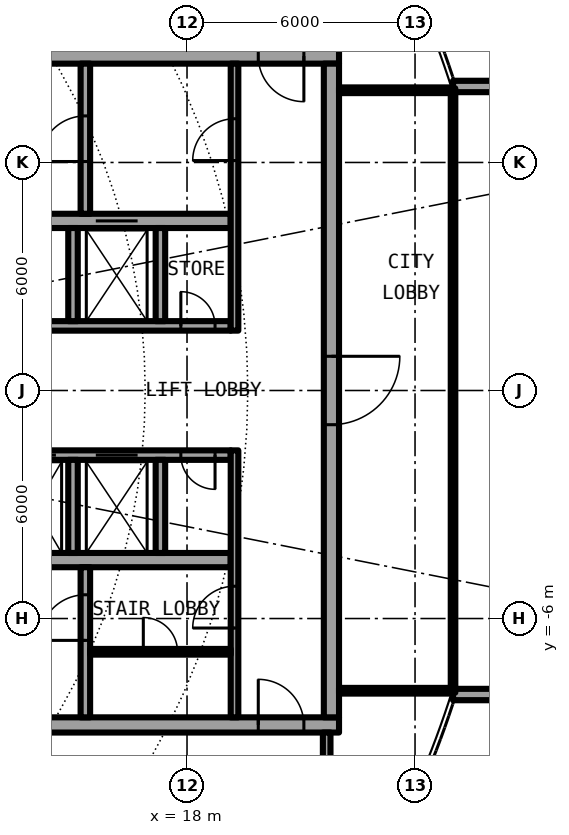
"""IFC4 building model, lengths in metres.
Left out: names, types, materials, properties, quantities, classifications, styles, units other than length and angle.
Written with IfcOpenShell. Run it as: python <this file> out.ifc"""

import sys

from ifc_helpers import new_model, si_unit, direction, frame, frame_2d, origin, place, context, subcontext, project, spatial, rectangle, extrude, element, fill, save


model = new_model("IFC4")
c1 = context("Model", 3, precision=1e-05, world=origin(), true_north=direction((0.0, 1.0)))
c2 = subcontext(c1, "Body", "Model", "MODEL_VIEW")
j1 = project(units=[si_unit("LENGTHUNIT", "METRE"), si_unit("PLANEANGLEUNIT", "RADIAN")], contexts=[c1])
p1 = place(None, origin())
s1 = spatial("IfcSite", under=j1, at=p1, CompositionType="ELEMENT")
p2 = place(p1, origin())
s2 = spatial("IfcBuilding", under=s1, at=p2, CompositionType="ELEMENT")
p3 = place(p2, frame((0.0, 0.0, 234.05)))
s3 = spatial("IfcBuildingStorey", under=s2, at=p3, CompositionType="ELEMENT", Elevation=234.05)
for number, where, z_axis, x_axis in (
    (1, (25.0, 8.0, 0.0), (0.0, 0.0, 1.0), (1.0, 0.0, 0.0)),
    (2, (25.0, -8.0, 0.0), (0.0, 0.0, 1.0), (1.0, 0.0, 0.0)),
):
    element("IfcWall", number, at=place(p3, frame(where, z_axis=z_axis, x_axis=x_axis)), inside=s3, PredefinedType="SOLIDWALL", context=c2, shape_type="SweptSolid", body=[
        extrude(rectangle(XDim=2.667, YDim=0.3, at=frame_2d((1.333, 0.0))), origin(), (0.0, 0.0, 1.0), 2.7),
    ])
p4 = place(p3, frame((22.0, 8.8, 0.0), z_axis=(0.0, 0.0, 1.0), x_axis=(-1.0, 0.0, 0.0)))
e3 = element("IfcWall", 3, at=p4, inside=s3, PredefinedType="SHEAR", context=c2, shape_type="SweptSolid", body=[
    extrude(rectangle(XDim=13.4, YDim=0.4, at=frame_2d((6.7, 0.0))), origin(), (0.0, 0.0, 1.0), 3.05),
])
p5 = place(p4, frame((0.925, 0.0, 0.0)))
e4 = element("IfcOpeningElement", 4, at=p5, cuts=e3, PredefinedType="OPENING", context=c2, shape_type="SweptSolid", body=[
    extrude(rectangle(XDim=1.2, YDim=2.3, at=frame_2d((0.6, 1.15))), frame((0.0, 0.21, 0.0), z_axis=(0.0, -1.0, 0.0), x_axis=(1.0, 0.0, 0.0)), (0.0, 0.0, 1.0), 0.42),
])
p6 = place(p3, frame((8.6, -8.8, 0.0), z_axis=(0.0, 0.0, 1.0), x_axis=(1.0, 0.0, 0.0)))
e5 = element("IfcWall", 5, at=p6, inside=s3, PredefinedType="SHEAR", context=c2, shape_type="SweptSolid", body=[
    extrude(rectangle(XDim=13.4, YDim=0.4, at=frame_2d((6.7, 0.0))), origin(), (0.0, 0.0, 1.0), 3.05),
])
p7 = place(p6, frame((11.275, 0.0, 0.0)))
e6 = element("IfcOpeningElement", 6, at=p7, cuts=e5, PredefinedType="OPENING", context=c2, shape_type="SweptSolid", body=[
    extrude(rectangle(XDim=1.2, YDim=2.3, at=frame_2d((0.6, 1.15))), frame((0.0, 0.21, 0.0), z_axis=(0.0, -1.0, 0.0), x_axis=(1.0, 0.0, 0.0)), (0.0, 0.0, 1.0), 0.42),
])
p8 = place(p3, frame((21.8, 8.6, 0.0), z_axis=(0.0, 0.0, 1.0), x_axis=(0.0, -1.0, 0.0)))
e7 = element("IfcWall", 7, at=p8, inside=s3, PredefinedType="SHEAR", context=c2, shape_type="SweptSolid", body=[
    extrude(rectangle(XDim=17.2, YDim=0.4, at=frame_2d((8.6, 0.0))), origin(), (0.0, 0.0, 1.0), 3.05),
])
p9 = place(p8, frame((7.7, 0.0, 0.0)))
e8 = element("IfcOpeningElement", 8, at=p9, cuts=e7, PredefinedType="OPENING", context=c2, shape_type="SweptSolid", body=[
    extrude(rectangle(XDim=1.8, YDim=2.3, at=frame_2d((0.9, 1.15))), frame((0.0, 0.21, 0.0), z_axis=(0.0, -1.0, 0.0), x_axis=(1.0, 0.0, 0.0)), (0.0, 0.0, 1.0), 0.42),
])
p10 = place(p3, frame((9.0, 1.7, 0.0), z_axis=(0.0, 0.0, 1.0), x_axis=(1.0, 0.0, 0.0)))
e9 = element("IfcWall", 9, at=p10, inside=s3, PredefinedType="SHEAR", context=c2, shape_type="SweptSolid", body=[
    extrude(rectangle(XDim=10.15, YDim=0.25, at=frame_2d((5.075, 0.0))), origin(), (0.0, 0.0, 1.0), 3.05),
])
p11 = place(p10, frame((2.488, 0.0, 0.0)))
e10 = element("IfcOpeningElement", 10, at=p11, cuts=e9, PredefinedType="OPENING", context=c2, shape_type="SweptSolid", body=[
    extrude(rectangle(XDim=0.9, YDim=2.3, at=frame_2d((0.45, 1.15))), frame((0.0, 0.135, 0.0), z_axis=(0.0, -1.0, 0.0), x_axis=(1.0, 0.0, 0.0)), (0.0, 0.0, 1.0), 0.27),
])
p12 = place(p10, frame((8.837, 0.0, 0.0)))
e11 = element("IfcOpeningElement", 11, at=p12, cuts=e9, PredefinedType="OPENING", context=c2, shape_type="SweptSolid", body=[
    extrude(rectangle(XDim=0.9, YDim=2.3, at=frame_2d((0.45, 1.15))), frame((0.0, 0.135, 0.0), z_axis=(0.0, -1.0, 0.0), x_axis=(1.0, 0.0, 0.0)), (0.0, 0.0, 1.0), 0.27),
])
p13 = place(p3, frame((9.0, 4.462, 0.0), z_axis=(0.0, 0.0, 1.0), x_axis=(1.0, 0.0, 0.0)))
e12 = element("IfcWall", 12, at=p13, inside=s3, PredefinedType="SHEAR", context=c2, shape_type="SweptSolid", body=[
    extrude(rectangle(XDim=10.15, YDim=0.375, at=frame_2d((5.075, 0.0))), origin(), (0.0, 0.0, 1.0), 3.05),
])
p14 = place(p13, frame((6.6, 0.0, 0.0)))
e13 = element("IfcOpeningElement", 13, at=p14, cuts=e12, PredefinedType="OPENING", context=c2, shape_type="SweptSolid", body=[
    extrude(rectangle(XDim=1.1, YDim=2.3, at=frame_2d((0.55, 1.15))), frame((0.0, 0.198, 0.0), z_axis=(0.0, -1.0, 0.0), x_axis=(1.0, 0.0, 0.0)), (0.0, 0.0, 1.0), 0.395),
])
p15 = place(p3, frame((15.325, 4.65, 0.0), z_axis=(0.0, 0.0, 1.0), x_axis=(0.0, 1.0, 0.0)))
e14 = element("IfcWall", 14, at=p15, inside=s3, PredefinedType="SHEAR", context=c2, shape_type="SweptSolid", body=[
    extrude(rectangle(XDim=3.95, YDim=0.25, at=frame_2d((1.975, 0.0))), origin(), (0.0, 0.0, 1.0), 3.05),
])
p16 = place(p15, frame((1.375, 0.0, 0.0)))
e15 = element("IfcOpeningElement", 15, at=p16, cuts=e14, PredefinedType="OPENING", context=c2, shape_type="SweptSolid", body=[
    extrude(rectangle(XDim=1.2, YDim=2.3, at=frame_2d((0.6, 1.15))), frame((0.0, 0.135, 0.0), z_axis=(0.0, -1.0, 0.0), x_axis=(1.0, 0.0, 0.0)), (0.0, 0.0, 1.0), 0.27),
])
for number, where, z_axis, x_axis in (
    (16, (15.0, 1.825, 0.0), (0.0, 0.0, 1.0), (0.0, 1.0, 0.0)),
    (17, (17.3, 1.825, 0.0), (0.0, 0.0, 1.0), (0.0, 1.0, 0.0)),
):
    element("IfcWall", number, at=place(p3, frame(where, z_axis=z_axis, x_axis=x_axis)), inside=s3, PredefinedType="SOLIDWALL", context=c2, shape_type="SweptSolid", body=[
        extrude(rectangle(XDim=2.45, YDim=0.25, at=frame_2d((1.225, 0.0))), origin(), (0.0, 0.0, 1.0), 2.7),
    ])
p17 = place(p3, frame((19.25, 1.575, 0.0), z_axis=(0.0, 0.0, 1.0), x_axis=(0.0, 1.0, 0.0)))
e18 = element("IfcWall", 18, at=p17, inside=s3, PredefinedType="SOLIDWALL", context=c2, shape_type="SweptSolid", body=[
    extrude(rectangle(XDim=7.025, YDim=0.2, at=frame_2d((3.513, 0.0))), origin(), (0.0, 0.0, 1.0), 2.7),
])
p18 = place(p17, frame((4.475, 0.0, 0.0)))
e19 = element("IfcOpeningElement", 19, at=p18, cuts=e18, PredefinedType="OPENING", context=c2, shape_type="SweptSolid", body=[
    extrude(rectangle(XDim=1.1, YDim=2.3, at=frame_2d((0.55, 1.15))), frame((0.0, 0.11, 0.0), z_axis=(0.0, -1.0, 0.0), x_axis=(1.0, 0.0, 0.0)), (0.0, 0.0, 1.0), 0.22),
])
p19 = place(p3, frame((19.15, -1.7, 0.0), z_axis=(0.0, 0.0, 1.0), x_axis=(-1.0, 0.0, 0.0)))
e20 = element("IfcWall", 20, at=p19, inside=s3, PredefinedType="SHEAR", context=c2, shape_type="SweptSolid", body=[
    extrude(rectangle(XDim=10.15, YDim=0.25, at=frame_2d((5.075, 0.0))), origin(), (0.0, 0.0, 1.0), 3.05),
])
p20 = place(p19, frame((8.663, 0.0, 0.0)))
e21 = element("IfcOpeningElement", 21, at=p20, cuts=e20, PredefinedType="OPENING", context=c2, shape_type="SweptSolid", body=[
    extrude(rectangle(XDim=1.1, YDim=2.3, at=frame_2d((0.55, 1.15))), frame((0.0, 0.135, 0.0), z_axis=(0.0, -1.0, 0.0), x_axis=(1.0, 0.0, 0.0)), (0.0, 0.0, 1.0), 0.27),
])
p21 = place(p19, frame((6.6, 0.0, 0.0)))
e22 = element("IfcOpeningElement", 22, at=p21, cuts=e20, PredefinedType="OPENING", context=c2, shape_type="SweptSolid", body=[
    extrude(rectangle(XDim=1.1, YDim=2.3, at=frame_2d((0.55, 1.15))), frame((0.0, 0.135, 0.0), z_axis=(0.0, -1.0, 0.0), x_axis=(1.0, 0.0, 0.0)), (0.0, 0.0, 1.0), 0.27),
])
p22 = place(p19, frame((4.6, 0.0, 0.0)))
e23 = element("IfcOpeningElement", 23, at=p22, cuts=e20, PredefinedType="OPENING", context=c2, shape_type="SweptSolid", body=[
    extrude(rectangle(XDim=1.1, YDim=2.3, at=frame_2d((0.55, 1.15))), frame((0.0, 0.135, 0.0), z_axis=(0.0, -1.0, 0.0), x_axis=(1.0, 0.0, 0.0)), (0.0, 0.0, 1.0), 0.27),
])
p23 = place(p19, frame((2.45, 0.0, 0.0)))
e24 = element("IfcOpeningElement", 24, at=p23, cuts=e20, PredefinedType="OPENING", context=c2, shape_type="SweptSolid", body=[
    extrude(rectangle(XDim=1.1, YDim=2.3, at=frame_2d((0.55, 1.15))), frame((0.0, 0.135, 0.0), z_axis=(0.0, -1.0, 0.0), x_axis=(1.0, 0.0, 0.0)), (0.0, 0.0, 1.0), 0.27),
])
p24 = place(p19, frame((0.413, 0.0, 0.0)))
e25 = element("IfcOpeningElement", 25, at=p24, cuts=e20, PredefinedType="OPENING", context=c2, shape_type="SweptSolid", body=[
    extrude(rectangle(XDim=0.9, YDim=2.3, at=frame_2d((0.45, 1.15))), frame((0.0, 0.135, 0.0), z_axis=(0.0, -1.0, 0.0), x_axis=(1.0, 0.0, 0.0)), (0.0, 0.0, 1.0), 0.27),
])
p25 = place(p3, frame((9.0, -4.462, 0.0), z_axis=(0.0, 0.0, 1.0), x_axis=(1.0, 0.0, 0.0)))
e26 = element("IfcWall", 26, at=p25, inside=s3, PredefinedType="SHEAR", context=c2, shape_type="SweptSolid", body=[
    extrude(rectangle(XDim=10.15, YDim=0.375, at=frame_2d((5.075, 0.0))), origin(), (0.0, 0.0, 1.0), 3.05),
])
p26 = place(p3, frame((15.325, -8.6, 0.0), z_axis=(0.0, 0.0, 1.0), x_axis=(0.0, 1.0, 0.0)))
e27 = element("IfcWall", 27, at=p26, inside=s3, PredefinedType="SHEAR", context=c2, shape_type="SweptSolid", body=[
    extrude(rectangle(XDim=3.95, YDim=0.25, at=frame_2d((1.975, 0.0))), origin(), (0.0, 0.0, 1.0), 3.05),
])
p27 = place(p26, frame((2.025, 0.0, 0.0)))
e28 = element("IfcOpeningElement", 28, at=p27, cuts=e27, PredefinedType="OPENING", context=c2, shape_type="SweptSolid", body=[
    extrude(rectangle(XDim=1.2, YDim=2.3, at=frame_2d((0.6, 1.15))), frame((0.0, 0.135, 0.0), z_axis=(0.0, -1.0, 0.0), x_axis=(1.0, 0.0, 0.0)), (0.0, 0.0, 1.0), 0.27),
])
for number, where, z_axis, x_axis in (
    (29, (15.0, -1.825, 0.0), (0.0, 0.0, 1.0), (0.0, -1.0, 0.0)),
    (30, (17.3, -1.825, 0.0), (0.0, 0.0, 1.0), (0.0, -1.0, 0.0)),
):
    element("IfcWall", number, at=place(p3, frame(where, z_axis=z_axis, x_axis=x_axis)), inside=s3, PredefinedType="SOLIDWALL", context=c2, shape_type="SweptSolid", body=[
        extrude(rectangle(XDim=2.45, YDim=0.25, at=frame_2d((1.225, 0.0))), origin(), (0.0, 0.0, 1.0), 2.7),
    ])
p28 = place(p3, frame((19.25, -8.6, 0.0), z_axis=(0.0, 0.0, 1.0), x_axis=(0.0, 1.0, 0.0)))
e31 = element("IfcWall", 31, at=p28, inside=s3, PredefinedType="SOLIDWALL", context=c2, shape_type="SweptSolid", body=[
    extrude(rectangle(XDim=7.025, YDim=0.2, at=frame_2d((3.513, 0.0))), origin(), (0.0, 0.0, 1.0), 2.7),
])
p29 = place(p28, frame((2.35, 0.0, 0.0)))
e32 = element("IfcOpeningElement", 32, at=p29, cuts=e31, PredefinedType="OPENING", context=c2, shape_type="SweptSolid", body=[
    extrude(rectangle(XDim=1.1, YDim=2.3, at=frame_2d((0.55, 1.15))), frame((0.0, 0.11, 0.0), z_axis=(0.0, -1.0, 0.0), x_axis=(1.0, 0.0, 0.0)), (0.0, 0.0, 1.0), 0.22),
])
p30 = place(p3, frame((15.45, -6.875, 0.0), z_axis=(0.0, 0.0, 1.0), x_axis=(1.0, 0.0, 0.0)))
e33 = element("IfcWall", 33, at=p30, inside=s3, PredefinedType="PARTITIONING", context=c2, shape_type="SweptSolid", body=[
    extrude(rectangle(XDim=3.7, YDim=0.15, at=frame_2d((1.85, 0.0))), origin(), (0.0, 0.0, 1.0), 2.7),
])
p31 = place(p30, frame((1.4, 0.0, 0.0)))
e34 = element("IfcOpeningElement", 34, at=p31, cuts=e33, PredefinedType="OPENING", context=c2, shape_type="SweptSolid", body=[
    extrude(rectangle(XDim=0.9, YDim=2.3, at=frame_2d((0.45, 1.15))), frame((0.0, 0.085, 0.0), z_axis=(0.0, -1.0, 0.0), x_axis=(1.0, 0.0, 0.0)), (0.0, 0.0, 1.0), 0.17),
])
for number, where, z_axis, x_axis in (
    (35, (22.0, -7.9, 0.0), (0.0, 0.0, 1.0), (1.0, 0.0, 0.0)),
    (36, (22.0, 7.9, 0.0), (0.0, 0.0, 1.0), (1.0, 0.0, 0.0)),
):
    element("IfcWall", number, at=place(p3, frame(where, z_axis=z_axis, x_axis=x_axis)), inside=s3, PredefinedType="PARTITIONING", context=c2, shape_type="SweptSolid", body=[
        extrude(rectangle(XDim=2.94, YDim=0.15, at=frame_2d((1.47, 0.0))), origin(), (0.0, 0.0, 1.0), 2.7),
    ])
p32 = place(p3, frame((25.0, -7.95, 0.0), z_axis=(0.0, 0.0, 1.0), x_axis=(0.0, 1.0, 0.0)))
e37 = element("IfcWall", 37, at=p32, inside=s3, PredefinedType="PARTITIONING", context=c2, shape_type="SweptSolid", body=[
    extrude(rectangle(XDim=15.9, YDim=0.12, at=frame_2d((7.95, 0.0))), origin(), (0.0, 0.0, 1.0), 2.7),
])
p33 = place(p32, frame((0.95, 0.0, 0.1)))
e38 = element("IfcOpeningElement", 38, at=p33, cuts=e37, PredefinedType="OPENING", context=c2, shape_type="SweptSolid", body=[
    extrude(rectangle(XDim=14.0, YDim=2.35, at=frame_2d((7.0, 1.175))), frame((0.0, 0.07, 0.0), z_axis=(0.0, -1.0, 0.0), x_axis=(1.0, 0.0, 0.0)), (0.0, 0.0, 1.0), 0.14),
])
p34 = place(p3, frame((21.675, -10.8, 0.0), z_axis=(0.0, 0.0, 1.0), x_axis=(0.0, 1.0, 0.0)))
e39 = element("IfcWall", 39, at=p34, inside=s3, PredefinedType="PARTITIONING", context=c2, shape_type="SweptSolid", body=[
    extrude(rectangle(XDim=1.8, YDim=0.2, at=frame_2d((0.9, 0.0))), origin(), (0.0, 0.0, 1.0), 2.7),
])
p35 = place(p14, origin())
e40 = element("IfcDoor", 40, at=p35, inside=s3, OperationType="DOUBLE_DOOR_SLIDING", PredefinedType="DOOR", context=c2, shape_type="SweptSolid", body=[
    extrude(rectangle(XDim=1.1, YDim=2.3, at=frame_2d((0.55, 1.15))), frame((0.0, 0.025, 0.0), z_axis=(0.0, -1.0, 0.0), x_axis=(1.0, 0.0, 0.0)), (0.0, 0.0, 1.0), 0.05),
])
fill(e13, e40)
p36 = place(p22, origin())
e41 = element("IfcDoor", 41, at=p36, inside=s3, OperationType="DOUBLE_DOOR_SLIDING", PredefinedType="DOOR", context=c2, shape_type="SweptSolid", body=[
    extrude(rectangle(XDim=1.1, YDim=2.3, at=frame_2d((0.55, 1.15))), frame((0.0, 0.025, 0.0), z_axis=(0.0, -1.0, 0.0), x_axis=(1.0, 0.0, 0.0)), (0.0, 0.0, 1.0), 0.05),
])
fill(e23, e41)
p37 = place(p23, origin())
e42 = element("IfcDoor", 42, at=p37, inside=s3, OperationType="DOUBLE_DOOR_SLIDING", PredefinedType="DOOR", context=c2, shape_type="SweptSolid", body=[
    extrude(rectangle(XDim=1.1, YDim=2.3, at=frame_2d((0.55, 1.15))), frame((0.0, 0.025, 0.0), z_axis=(0.0, -1.0, 0.0), x_axis=(1.0, 0.0, 0.0)), (0.0, 0.0, 1.0), 0.05),
])
fill(e24, e42)
p38 = place(p12, origin())
e43 = element("IfcDoor", 43, at=p38, inside=s3, OperationType="SINGLE_SWING_LEFT", PredefinedType="DOOR", context=c2, shape_type="SweptSolid", body=[
    extrude(rectangle(XDim=0.9, YDim=2.3, at=frame_2d((0.45, 1.15))), frame((0.0, 0.025, 0.0), z_axis=(0.0, -1.0, 0.0), x_axis=(1.0, 0.0, 0.0)), (0.0, 0.0, 1.0), 0.05),
])
fill(e11, e43)
p39 = place(p24, origin())
e44 = element("IfcDoor", 44, at=p39, inside=s3, OperationType="SINGLE_SWING_RIGHT", PredefinedType="DOOR", context=c2, shape_type="SweptSolid", body=[
    extrude(rectangle(XDim=0.9, YDim=2.3, at=frame_2d((0.45, 1.15))), frame((0.0, 0.025, 0.0), z_axis=(0.0, -1.0, 0.0), x_axis=(1.0, 0.0, 0.0)), (0.0, 0.0, 1.0), 0.05),
])
fill(e25, e44)
p40 = place(p31, origin())
e45 = element("IfcDoor", 45, at=p40, inside=s3, OperationType="SINGLE_SWING_LEFT", PredefinedType="DOOR", context=c2, shape_type="SweptSolid", body=[
    extrude(rectangle(XDim=0.9, YDim=2.3, at=frame_2d((0.45, 1.15))), frame((0.0, 0.025, 0.0), z_axis=(0.0, -1.0, 0.0), x_axis=(1.0, 0.0, 0.0)), (0.0, 0.0, 1.0), 0.05),
])
fill(e34, e45)
p41 = place(p16, origin())
e46 = element("IfcDoor", 46, at=p41, inside=s3, OperationType="SINGLE_SWING_LEFT", PredefinedType="DOOR", context=c2, shape_type="SweptSolid", body=[
    extrude(rectangle(XDim=1.2, YDim=2.3, at=frame_2d((0.6, 1.15))), frame((0.0, 0.025, 0.0), z_axis=(0.0, -1.0, 0.0), x_axis=(1.0, 0.0, 0.0)), (0.0, 0.0, 1.0), 0.05),
])
fill(e15, e46)
p42 = place(p27, origin())
e47 = element("IfcDoor", 47, at=p42, inside=s3, OperationType="SINGLE_SWING_LEFT", PredefinedType="DOOR", context=c2, shape_type="SweptSolid", body=[
    extrude(rectangle(XDim=1.2, YDim=2.3, at=frame_2d((0.6, 1.15))), frame((0.0, 0.025, 0.0), z_axis=(0.0, -1.0, 0.0), x_axis=(1.0, 0.0, 0.0)), (0.0, 0.0, 1.0), 0.05),
])
fill(e28, e47)
p43 = place(p18, origin())
e48 = element("IfcDoor", 48, at=p43, inside=s3, OperationType="SINGLE_SWING_LEFT", PredefinedType="DOOR", context=c2, shape_type="SweptSolid", body=[
    extrude(rectangle(XDim=1.1, YDim=2.3, at=frame_2d((0.55, 1.15))), frame((0.0, 0.025, 0.0), z_axis=(0.0, -1.0, 0.0), x_axis=(1.0, 0.0, 0.0)), (0.0, 0.0, 1.0), 0.05),
])
fill(e19, e48)
p44 = place(p29, origin())
e49 = element("IfcDoor", 49, at=p44, inside=s3, OperationType="SINGLE_SWING_RIGHT", PredefinedType="DOOR", context=c2, shape_type="SweptSolid", body=[
    extrude(rectangle(XDim=1.1, YDim=2.3, at=frame_2d((0.55, 1.15))), frame((0.0, 0.025, 0.0), z_axis=(0.0, -1.0, 0.0), x_axis=(1.0, 0.0, 0.0)), (0.0, 0.0, 1.0), 0.05),
])
fill(e32, e49)
p45 = place(p5, origin())
e50 = element("IfcDoor", 50, at=p45, inside=s3, OperationType="SINGLE_SWING_RIGHT", PredefinedType="DOOR", context=c2, shape_type="SweptSolid", body=[
    extrude(rectangle(XDim=1.2, YDim=2.3, at=frame_2d((0.6, 1.15))), frame((0.0, 0.025, 0.0), z_axis=(0.0, -1.0, 0.0), x_axis=(1.0, 0.0, 0.0)), (0.0, 0.0, 1.0), 0.05),
])
fill(e4, e50)
p46 = place(p7, origin())
e51 = element("IfcDoor", 51, at=p46, inside=s3, OperationType="SINGLE_SWING_LEFT", PredefinedType="DOOR", context=c2, shape_type="SweptSolid", body=[
    extrude(rectangle(XDim=1.2, YDim=2.3, at=frame_2d((0.6, 1.15))), frame((0.0, 0.025, 0.0), z_axis=(0.0, -1.0, 0.0), x_axis=(1.0, 0.0, 0.0)), (0.0, 0.0, 1.0), 0.05),
])
fill(e6, e51)
p47 = place(p9, origin())
e52 = element("IfcDoor", 52, at=p47, inside=s3, OperationType="SINGLE_SWING_LEFT", PredefinedType="DOOR", context=c2, shape_type="SweptSolid", body=[
    extrude(rectangle(XDim=1.8, YDim=2.3, at=frame_2d((0.9, 1.15))), frame((0.0, 0.025, 0.0), z_axis=(0.0, -1.0, 0.0), x_axis=(1.0, 0.0, 0.0)), (0.0, 0.0, 1.0), 0.05),
])
fill(e8, e52)
p48 = place(p33, origin())
e53 = element("IfcWindow", 53, at=p48, inside=s3, PartitioningType="SINGLE_PANEL", PredefinedType="WINDOW", context=c2, shape_type="SweptSolid", body=[
    extrude(rectangle(XDim=14.0, YDim=2.35, at=frame_2d((7.0, 1.175))), frame((0.0, 0.03, 0.0), z_axis=(0.0, -1.0, 0.0), x_axis=(1.0, 0.0, 0.0)), (0.0, 0.0, 1.0), 0.06),
])
fill(e38, e53)
save(model, sys.argv[1])
